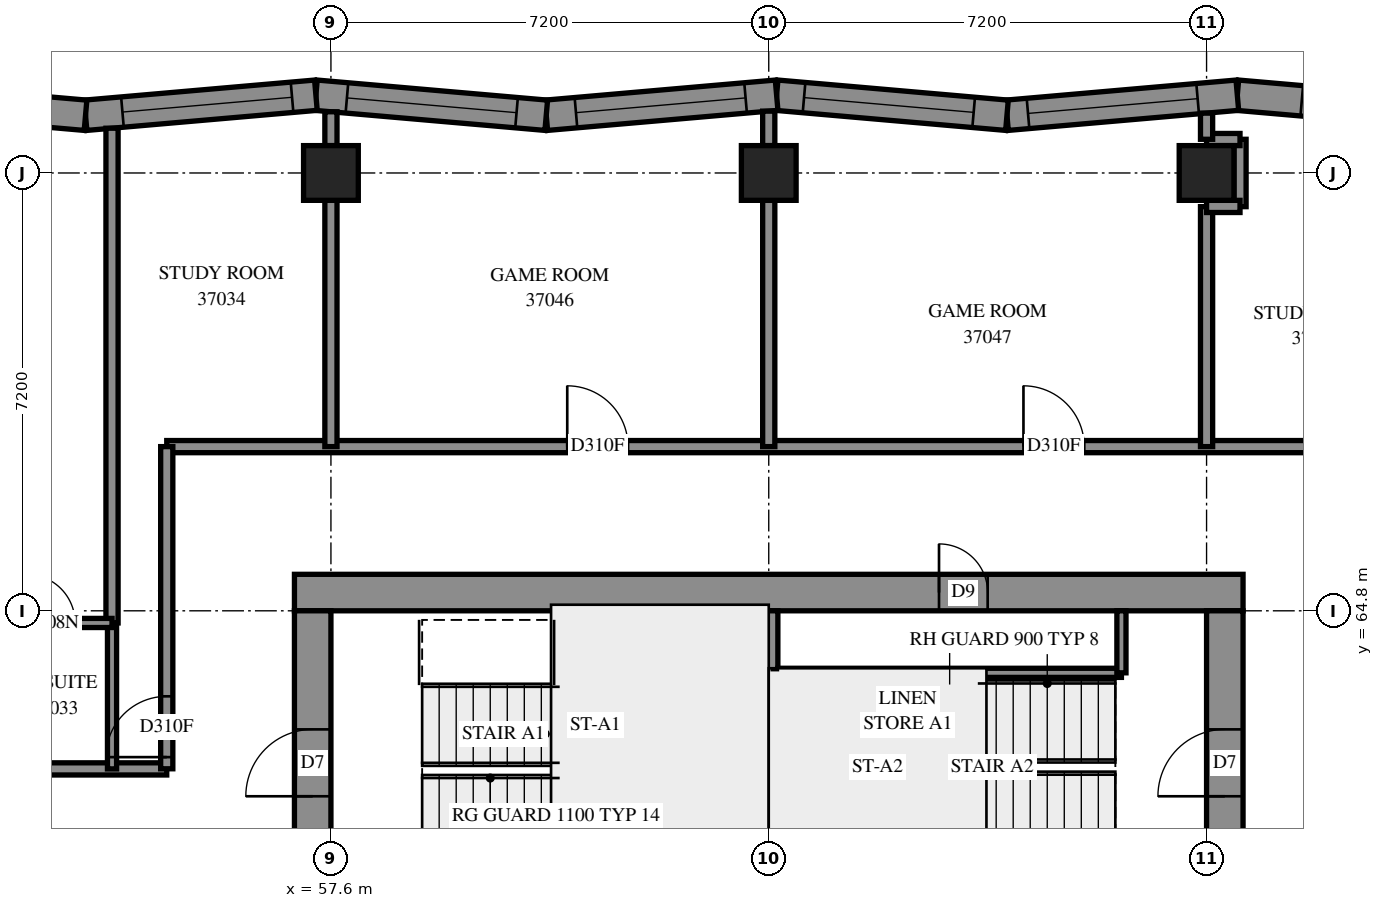
"""IFC4 building model, lengths in metres.
Left out: names, types, materials, properties, quantities, classifications, styles, units other than length and angle.
Written with IfcOpenShell. Run it as: python <this file> out.ifc"""

import sys

from ifc_helpers import new_model, si_unit, direction, frame, frame_2d, origin, origin_2d, place, context, subcontext, project, spatial, polyline, rectangle, outline, extrude, element, fill, save


model = new_model("IFC4")
c1 = context("Model", 3, precision=1e-05, world=origin(), true_north=direction((0.0, 1.0)))
c2 = subcontext(c1, "Body", "Model", "MODEL_VIEW")
j1 = project(units=[si_unit("LENGTHUNIT", "METRE"), si_unit("PLANEANGLEUNIT", "RADIAN")], contexts=[c1])
p1 = place(None, origin())
s1 = spatial("IfcSite", under=j1, at=p1, CompositionType="ELEMENT")
p2 = place(p1, origin())
s2 = spatial("IfcBuilding", under=s1, at=p2, CompositionType="ELEMENT")
p3 = place(p2, frame((0.0, 0.0, 138.8)))
s3 = spatial("IfcBuildingStorey", under=s2, at=p3, CompositionType="ELEMENT", Elevation=138.8)
for number, where, z_axis, x_axis in (
    (1, (57.6, 72.0, 0.0), (0.0, 0.0, 1.0), (1.0, 0.0, 0.0)),
    (2, (64.8, 72.0, 0.0), (0.0, 0.0, 1.0), (1.0, 0.0, 0.0)),
    (3, (72.0, 72.0, 0.0), (0.0, 0.0, 1.0), (1.0, 0.0, 0.0)),
):
    element("IfcColumn", number, at=place(p3, frame(where, z_axis=z_axis, x_axis=x_axis)), inside=s3, PredefinedType="COLUMN", context=c2, shape_type="SweptSolid", body=[
        extrude(rectangle(XDim=0.9, YDim=0.9, at=origin_2d()), origin(), (0.0, 0.0, 1.0), 3.1),
    ])
p4 = place(p3, frame((57.0, 65.1, -0.3), z_axis=(0.0, 0.0, 1.0), x_axis=(1.0, 0.0, 0.0)))
e4 = element("IfcWall", 4, at=p4, inside=s3, PredefinedType="SHEAR", context=c2, shape_type="SweptSolid", body=[
    extrude(rectangle(XDim=15.6, YDim=0.6, at=frame_2d((7.8, 0.0))), origin(), (0.0, 0.0, 1.0), 2.7),
])
p5 = place(p4, frame((10.6, 0.0, 0.3)))
e5 = element("IfcOpeningElement", 5, at=p5, cuts=e4, PredefinedType="OPENING", context=c2, shape_type="SweptSolid", body=[
    extrude(rectangle(XDim=0.8, YDim=2.1, at=frame_2d((0.4, 1.05))), frame((0.0, 0.31, 0.0), z_axis=(0.0, -1.0, 0.0), x_axis=(1.0, 0.0, 0.0)), (0.0, 0.0, 1.0), 0.62),
])
p6 = place(p3, frame((57.3, 50.4, -0.3), z_axis=(0.0, 0.0, 1.0), x_axis=(0.0, 1.0, 0.0)))
e6 = element("IfcWall", 6, at=p6, inside=s3, PredefinedType="SHEAR", context=c2, shape_type="SweptSolid", body=[
    extrude(rectangle(XDim=14.4, YDim=0.6, at=frame_2d((7.2, 0.0))), origin(), (0.0, 0.0, 1.0), 2.7),
])
p7 = place(p6, frame((4.55, 0.0, 0.3)))
e7 = element("IfcOpeningElement", 7, at=p7, cuts=e6, PredefinedType="OPENING", context=c2, shape_type="SweptSolid", body=[
    extrude(rectangle(XDim=1.1, YDim=2.1, at=frame_2d((0.55, 1.05))), frame((0.0, 0.31, 0.0), z_axis=(0.0, -1.0, 0.0), x_axis=(1.0, 0.0, 0.0)), (0.0, 0.0, 1.0), 0.62),
])
p8 = place(p6, frame((11.35, 0.0, 0.3)))
e8 = element("IfcOpeningElement", 8, at=p8, cuts=e6, PredefinedType="OPENING", context=c2, shape_type="SweptSolid", body=[
    extrude(rectangle(XDim=1.1, YDim=2.1, at=frame_2d((0.55, 1.05))), frame((0.0, 0.31, 0.0), z_axis=(0.0, -1.0, 0.0), x_axis=(1.0, 0.0, 0.0)), (0.0, 0.0, 1.0), 0.62),
])
p9 = place(p3, frame((72.3, 50.4, -0.3), z_axis=(0.0, 0.0, 1.0), x_axis=(0.0, 1.0, 0.0)))
e9 = element("IfcWall", 9, at=p9, inside=s3, PredefinedType="SHEAR", context=c2, shape_type="SweptSolid", body=[
    extrude(rectangle(XDim=14.4, YDim=0.6, at=frame_2d((7.2, 0.0))), origin(), (0.0, 0.0, 1.0), 2.7),
])
p10 = place(p9, frame((4.55, 0.0, 0.3)))
e10 = element("IfcOpeningElement", 10, at=p10, cuts=e9, PredefinedType="OPENING", context=c2, shape_type="SweptSolid", body=[
    extrude(rectangle(XDim=1.1, YDim=2.1, at=frame_2d((0.55, 1.05))), frame((0.0, 0.31, 0.0), z_axis=(0.0, -1.0, 0.0), x_axis=(1.0, 0.0, 0.0)), (0.0, 0.0, 1.0), 0.62),
])
p11 = place(p9, frame((11.35, 0.0, 0.3)))
e11 = element("IfcOpeningElement", 11, at=p11, cuts=e9, PredefinedType="OPENING", context=c2, shape_type="SweptSolid", body=[
    extrude(rectangle(XDim=1.1, YDim=2.1, at=frame_2d((0.55, 1.05))), frame((0.0, 0.31, 0.0), z_axis=(0.0, -1.0, 0.0), x_axis=(1.0, 0.0, 0.0)), (0.0, 0.0, 1.0), 0.62),
])
p12 = place(p3, frame((64.8, 60.6, 0.0), z_axis=(0.0, 0.0, 1.0), x_axis=(0.0, 1.0, 0.0)))
e12 = element("IfcWall", 12, at=p12, inside=s3, PredefinedType="SOLIDWALL", context=c2, shape_type="SweptSolid", body=[
    extrude(rectangle(XDim=4.2, YDim=0.3, at=frame_2d((2.1, 0.0))), origin(), (0.0, 0.0, 1.0), 3.1),
])
p13 = place(p3, frame((76.314, 72.947, 0.0), z_axis=(0.0, 0.0, 1.0), x_axis=(-0.9962271263, 0.0867842891, 0.0)))
e13 = element("IfcWall", 13, at=p13, inside=s3, PredefinedType="SOLIDWALL", context=c2, shape_type="SweptSolid", body=[
    extrude(outline(polyline([(0.041, -0.25), (3.844, -0.25), (3.8, 0.25), (-0.041, 0.25), (0.041, -0.25)])), origin(), (0.0, 0.0, 1.0), 3.1),
])
p14 = place(p13, frame((1.558, 0.0, 0.45)))
e14 = element("IfcOpeningElement", 14, at=p14, cuts=e13, PredefinedType="OPENING", context=c2, shape_type="SweptSolid", body=[
    extrude(rectangle(XDim=1.2, YDim=2.5, at=frame_2d((0.6, 1.25))), frame((0.0, 0.26, 0.0), z_axis=(0.0, -1.0, 0.0), x_axis=(1.0, 0.0, 0.0)), (0.0, 0.0, 1.0), 0.52),
])
p15 = place(p3, frame((72.506, 73.279, 0.0), z_axis=(0.0, 0.0, 1.0), x_axis=(-0.9962273538, -0.0867816769, 0.0)))
e15 = element("IfcWall", 15, at=p15, inside=s3, PredefinedType="SOLIDWALL", context=c2, shape_type="SweptSolid", body=[
    extrude(outline(polyline([(-0.022, -0.25), (3.781, -0.25), (3.824, 0.25), (0.022, 0.25), (-0.022, -0.25)])), origin(), (0.0, 0.0, 1.0), 3.1),
])
p16 = place(p15, frame((0.655, 0.0, 0.45)))
e16 = element("IfcOpeningElement", 16, at=p16, cuts=e15, PredefinedType="OPENING", context=c2, shape_type="SweptSolid", body=[
    extrude(rectangle(XDim=2.8, YDim=2.5, at=frame_2d((1.4, 1.25))), frame((0.0, 0.26, 0.0), z_axis=(0.0, -1.0, 0.0), x_axis=(1.0, 0.0, 0.0)), (0.0, 0.0, 1.0), 0.52),
])
p17 = place(p3, frame((68.718, 72.949, 0.0), z_axis=(0.0, 0.0, 1.0), x_axis=(-0.9962273538, 0.0867816769, 0.0)))
e17 = element("IfcWall", 17, at=p17, inside=s3, PredefinedType="SOLIDWALL", context=c2, shape_type="SweptSolid", body=[
    extrude(outline(polyline([(0.022, -0.25), (3.824, -0.25), (3.781, 0.25), (-0.022, 0.25), (0.022, -0.25)])), origin(), (0.0, 0.0, 1.0), 3.1),
])
p18 = place(p17, frame((0.55, 0.0, 0.45)))
e18 = element("IfcOpeningElement", 18, at=p18, cuts=e17, PredefinedType="OPENING", context=c2, shape_type="SweptSolid", body=[
    extrude(rectangle(XDim=2.8, YDim=2.5, at=frame_2d((1.4, 1.25))), frame((0.0, 0.26, 0.0), z_axis=(0.0, -1.0, 0.0), x_axis=(1.0, 0.0, 0.0)), (0.0, 0.0, 1.0), 0.52),
])
p19 = place(p3, frame((64.929, 73.279, 0.0), z_axis=(0.0, 0.0, 1.0), x_axis=(-0.9962271558, -0.0867839505, 0.0)))
e19 = element("IfcWall", 19, at=p19, inside=s3, PredefinedType="SOLIDWALL", context=c2, shape_type="SweptSolid", body=[
    extrude(outline(polyline([(-0.022, -0.25), (3.781, -0.25), (3.824, 0.25), (0.022, 0.25), (-0.022, -0.25)])), origin(), (0.0, 0.0, 1.0), 3.1),
])
p20 = place(p19, frame((0.512, 0.0, 0.45)))
e20 = element("IfcOpeningElement", 20, at=p20, cuts=e19, PredefinedType="OPENING", context=c2, shape_type="SweptSolid", body=[
    extrude(rectangle(XDim=2.8, YDim=2.5, at=frame_2d((1.4, 1.25))), frame((0.0, 0.26, 0.0), z_axis=(0.0, -1.0, 0.0), x_axis=(1.0, 0.0, 0.0)), (0.0, 0.0, 1.0), 0.52),
])
p21 = place(p3, frame((61.141, 72.949, 0.0), z_axis=(0.0, 0.0, 1.0), x_axis=(-0.9962273538, 0.0867816769, 0.0)))
e21 = element("IfcWall", 21, at=p21, inside=s3, PredefinedType="SOLIDWALL", context=c2, shape_type="SweptSolid", body=[
    extrude(outline(polyline([(0.022, -0.25), (3.824, -0.25), (3.781, 0.25), (-0.022, 0.25), (0.022, -0.25)])), origin(), (0.0, 0.0, 1.0), 3.1),
])
p22 = place(p21, frame((0.49, 0.0, 0.45)))
e22 = element("IfcOpeningElement", 22, at=p22, cuts=e21, PredefinedType="OPENING", context=c2, shape_type="SweptSolid", body=[
    extrude(rectangle(XDim=2.8, YDim=2.5, at=frame_2d((1.4, 1.25))), frame((0.0, 0.26, 0.0), z_axis=(0.0, -1.0, 0.0), x_axis=(1.0, 0.0, 0.0)), (0.0, 0.0, 1.0), 0.52),
])
p23 = place(p3, frame((57.353, 73.279, 0.0), z_axis=(0.0, 0.0, 1.0), x_axis=(-0.9962273538, -0.0867816769, 0.0)))
e23 = element("IfcWall", 23, at=p23, inside=s3, PredefinedType="SOLIDWALL", context=c2, shape_type="SweptSolid", body=[
    extrude(outline(polyline([(-0.022, -0.25), (3.781, -0.25), (3.824, 0.25), (0.022, 0.25), (-0.022, -0.25)])), origin(), (0.0, 0.0, 1.0), 3.1),
])
p24 = place(p23, frame((0.394, 0.0, 0.45)))
e24 = element("IfcOpeningElement", 24, at=p24, cuts=e23, PredefinedType="OPENING", context=c2, shape_type="SweptSolid", body=[
    extrude(rectangle(XDim=2.8, YDim=2.5, at=frame_2d((1.4, 1.25))), frame((0.0, 0.26, 0.0), z_axis=(0.0, -1.0, 0.0), x_axis=(1.0, 0.0, 0.0)), (0.0, 0.0, 1.0), 0.52),
])
p25 = place(p3, frame((53.564, 72.949, 0.0), z_axis=(0.0, 0.0, 1.0), x_axis=(-0.9962271558, 0.0867839505, 0.0)))
e25 = element("IfcWall", 25, at=p25, inside=s3, PredefinedType="SOLIDWALL", context=c2, shape_type="SweptSolid", body=[
    extrude(outline(polyline([(0.022, -0.25), (3.824, -0.25), (3.781, 0.25), (-0.022, 0.25), (0.022, -0.25)])), origin(), (0.0, 0.0, 1.0), 3.1),
])
p26 = place(p25, frame((1.088, 0.0, 0.45)))
e26 = element("IfcOpeningElement", 26, at=p26, cuts=e25, PredefinedType="OPENING", context=c2, shape_type="SweptSolid", body=[
    extrude(rectangle(XDim=1.2, YDim=2.5, at=frame_2d((0.6, 1.25))), frame((0.0, 0.26, 0.0), z_axis=(0.0, -1.0, 0.0), x_axis=(1.0, 0.0, 0.0)), (0.0, 0.0, 1.0), 0.52),
])
p27 = place(p3, frame((64.95, 63.78, 0.0), z_axis=(0.0, 0.0, 1.0), x_axis=(1.0, 0.0, 0.0)))
e27 = element("IfcWall", 27, at=p27, inside=s3, PredefinedType="PARTITIONING", context=c2, shape_type="SweptSolid", body=[
    extrude(rectangle(XDim=5.65, YDim=0.15, at=frame_2d((2.825, 0.0))), origin(), (0.0, 0.0, 1.0), 3.1),
])
p28 = place(p3, frame((70.6, 63.78, 0.0), z_axis=(0.0, 0.0, 1.0), x_axis=(0.0, 1.0, 0.0)))
e28 = element("IfcWall", 28, at=p28, inside=s3, PredefinedType="PARTITIONING", context=c2, shape_type="SweptSolid", body=[
    extrude(rectangle(XDim=1.02, YDim=0.15, at=frame_2d((0.51, 0.0))), origin(), (0.0, 0.0, 1.0), 3.1),
])
p29 = place(p3, frame((54.9, 67.5, 0.0), z_axis=(0.0, 0.0, 1.0), x_axis=(1.0, 0.0, 0.0)))
e29 = element("IfcWall", 29, at=p29, inside=s3, PredefinedType="PARTITIONING", context=c2, shape_type="SweptSolid", body=[
    extrude(rectangle(XDim=19.8, YDim=0.2, at=frame_2d((9.9, 0.0))), origin(), (0.0, 0.0, 1.0), 3.1),
])
p30 = place(p29, frame((6.586, 0.0, 0.0)))
e30 = element("IfcOpeningElement", 30, at=p30, cuts=e29, PredefinedType="OPENING", context=c2, shape_type="SweptSolid", body=[
    extrude(rectangle(XDim=1.0, YDim=2.1, at=frame_2d((0.5, 1.05))), frame((0.0, 0.11, 0.0), z_axis=(0.0, -1.0, 0.0), x_axis=(1.0, 0.0, 0.0)), (0.0, 0.0, 1.0), 0.22),
])
p31 = place(p29, frame((14.089, 0.0, 0.0)))
e31 = element("IfcOpeningElement", 31, at=p31, cuts=e29, PredefinedType="OPENING", context=c2, shape_type="SweptSolid", body=[
    extrude(rectangle(XDim=1.0, YDim=2.1, at=frame_2d((0.5, 1.05))), frame((0.0, 0.11, 0.0), z_axis=(0.0, -1.0, 0.0), x_axis=(1.0, 0.0, 0.0)), (0.0, 0.0, 1.0), 0.22),
])
p32 = place(p3, frame((40.602, 62.2, 0.0), z_axis=(0.0, 0.0, 1.0), x_axis=(1.0, 0.0, 0.0)))
e32 = element("IfcWall", 32, at=p32, inside=s3, PredefinedType="PARTITIONING", context=c2, shape_type="SweptSolid", body=[
    extrude(rectangle(XDim=14.298, YDim=0.2, at=frame_2d((7.149, 0.0))), origin(), (0.0, 0.0, 1.0), 3.1),
])
p33 = place(p32, frame((1.306, 0.0, 0.0)))
e33 = element("IfcOpeningElement", 33, at=p33, cuts=e32, PredefinedType="OPENING", context=c2, shape_type="SweptSolid", body=[
    extrude(rectangle(XDim=0.9, YDim=2.1, at=frame_2d((0.45, 1.05))), frame((0.0, 0.11, 0.0), z_axis=(0.0, -1.0, 0.0), x_axis=(1.0, 0.0, 0.0)), (0.0, 0.0, 1.0), 0.22),
])
p34 = place(p32, frame((8.455, 0.0, 0.0)))
e34 = element("IfcOpeningElement", 34, at=p34, cuts=e32, PredefinedType="OPENING", context=c2, shape_type="SweptSolid", body=[
    extrude(rectangle(XDim=0.9, YDim=2.1, at=frame_2d((0.45, 1.05))), frame((0.0, 0.11, 0.0), z_axis=(0.0, -1.0, 0.0), x_axis=(1.0, 0.0, 0.0)), (0.0, 0.0, 1.0), 0.22),
])
p35 = place(p3, frame((54.0, 64.6, 0.0), z_axis=(0.0, 0.0, 1.0), x_axis=(0.0, 1.0, 0.0)))
e35 = element("IfcWall", 35, at=p35, inside=s3, PredefinedType="PARTITIONING", context=c2, shape_type="SweptSolid", body=[
    extrude(rectangle(XDim=8.136, YDim=0.2, at=frame_2d((4.068, 0.0))), origin(), (0.0, 0.0, 1.0), 3.1),
])
p36 = place(p3, frame((54.9, 62.202, 0.0), z_axis=(0.0, 0.0, 1.0), x_axis=(0.0, 1.0, 0.0)))
e36 = element("IfcWall", 36, at=p36, inside=s3, PredefinedType="PARTITIONING", context=c2, shape_type="SweptSolid", body=[
    extrude(rectangle(XDim=5.298, YDim=0.2, at=frame_2d((2.649, 0.0))), origin(), (0.0, 0.0, 1.0), 3.1),
])
p37 = place(p36, frame((0.192, 0.0, 0.0)))
e37 = element("IfcOpeningElement", 37, at=p37, cuts=e36, PredefinedType="OPENING", context=c2, shape_type="SweptSolid", body=[
    extrude(rectangle(XDim=1.0, YDim=2.1, at=frame_2d((0.5, 1.05))), frame((0.0, 0.11, 0.0), z_axis=(0.0, -1.0, 0.0), x_axis=(1.0, 0.0, 0.0)), (0.0, 0.0, 1.0), 0.22),
])
for number, where, z_axis, x_axis in (
    (38, (57.6, 67.5, 0.0), (0.0, 0.0, 1.0), (0.0, 1.0, 0.0)),
    (39, (64.8, 67.5, 0.0), (0.0, 0.0, 1.0), (0.0, 1.0, 0.0)),
):
    element("IfcWall", number, at=place(p3, frame(where, z_axis=z_axis, x_axis=x_axis)), inside=s3, PredefinedType="PARTITIONING", context=c2, shape_type="SweptSolid", body=[
        extrude(rectangle(XDim=4.05, YDim=0.2, at=frame_2d((2.025, 0.0))), origin(), (0.0, 0.0, 1.0), 3.1),
    ])
p38 = place(p3, frame((72.0, 67.5, 0.0), z_axis=(0.0, 0.0, 1.0), x_axis=(0.0, 1.0, 0.0)))
e40 = element("IfcWall", 40, at=p38, inside=s3, PredefinedType="PARTITIONING", context=c2, shape_type="SweptSolid", body=[
    extrude(rectangle(XDim=3.946, YDim=0.2, at=frame_2d((1.973, 0.0))), origin(), (0.0, 0.0, 1.0), 3.1),
])
p39 = place(p3, frame((54.0, 62.2, 0.0), z_axis=(0.0, 0.0, 1.0), x_axis=(0.0, 1.0, 0.0)))
e41 = element("IfcWall", 41, at=p39, inside=s3, PredefinedType="PARTITIONING", context=c2, shape_type="SweptSolid", body=[
    extrude(rectangle(XDim=2.4, YDim=0.15, at=frame_2d((1.2, 0.0))), origin(), (0.0, 0.0, 1.0), 3.1),
])
p40 = place(p3, frame((52.1, 64.6, 0.0), z_axis=(0.0, 0.0, 1.0), x_axis=(1.0, 0.0, 0.0)))
e42 = element("IfcWall", 42, at=p40, inside=s3, PredefinedType="PARTITIONING", context=c2, shape_type="SweptSolid", body=[
    extrude(rectangle(XDim=1.9, YDim=0.15, at=frame_2d((0.95, 0.0))), origin(), (0.0, 0.0, 1.0), 3.1),
])
p41 = place(p40, frame((0.493, 0.0, 0.0)))
e43 = element("IfcOpeningElement", 43, at=p41, cuts=e42, PredefinedType="OPENING", context=c2, shape_type="SweptSolid", body=[
    extrude(rectangle(XDim=0.8, YDim=2.1, at=frame_2d((0.4, 1.05))), frame((0.0, 0.085, 0.0), z_axis=(0.0, -1.0, 0.0), x_axis=(1.0, 0.0, 0.0)), (0.0, 0.0, 1.0), 0.17),
])
p42 = place(p3, frame((72.55, 71.446, 0.0), z_axis=(0.0, 0.0, 1.0), x_axis=(0.0, 1.0, 0.0)))
e44 = element("IfcWall", 44, at=p42, inside=s3, PredefinedType="PARTITIONING", context=c2, shape_type="SweptSolid", body=[
    extrude(rectangle(XDim=1.108, YDim=0.2, at=frame_2d((0.554, 0.0))), origin(), (0.0, 0.0, 1.0), 3.1),
])
for number, where, z_axis, x_axis in (
    (45, (72.0, 71.45, 0.0), (0.0, 0.0, 1.0), (1.0, 0.0, 0.0)),
    (46, (72.0, 72.55, 0.0), (0.0, 0.0, 1.0), (1.0, 0.0, 0.0)),
):
    element("IfcWall", number, at=place(p3, frame(where, z_axis=z_axis, x_axis=x_axis)), inside=s3, PredefinedType="PARTITIONING", context=c2, shape_type="SweptSolid", body=[
        extrude(rectangle(XDim=0.55, YDim=0.2, at=frame_2d((0.275, 0.0))), origin(), (0.0, 0.0, 1.0), 3.1),
    ])
p43 = place(p3, frame((64.8, 72.45, 0.0), z_axis=(0.0, 0.0, 1.0), x_axis=(0.0, 1.0, 0.0)))
e47 = element("IfcWall", 47, at=p43, inside=s3, PredefinedType="PARTITIONING", context=c2, shape_type="SweptSolid", body=[
    extrude(rectangle(XDim=0.567, YDim=0.2, at=frame_2d((0.283, 0.0))), origin(), (0.0, 0.0, 1.0), 3.1),
])
p44 = place(p3, frame((57.6, 72.45, 0.0), z_axis=(0.0, 0.0, 1.0), x_axis=(0.0, 1.0, 0.0)))
e48 = element("IfcWall", 48, at=p44, inside=s3, PredefinedType="PARTITIONING", context=c2, shape_type="SweptSolid", body=[
    extrude(rectangle(XDim=0.557, YDim=0.2, at=frame_2d((0.278, 0.0))), origin(), (0.0, 0.0, 1.0), 3.1),
])
p45 = place(p3, frame((72.0, 72.554, 0.0), z_axis=(0.0, 0.0, 1.0), x_axis=(0.0, 1.0, 0.0)))
e49 = element("IfcWall", 49, at=p45, inside=s3, PredefinedType="PARTITIONING", context=c2, shape_type="SweptSolid", body=[
    extrude(rectangle(XDim=0.43, YDim=0.2, at=frame_2d((0.215, 0.0))), origin(), (0.0, 0.0, 1.0), 3.1),
])
p46 = place(p14, origin())
e50 = element("IfcWindow", 50, at=p46, inside=s3, PartitioningType="SINGLE_PANEL", PredefinedType="WINDOW", context=c2, shape_type="SweptSolid", body=[
    extrude(rectangle(XDim=1.2, YDim=2.5, at=frame_2d((0.6, 1.25))), frame((0.0, 0.18, 0.0), z_axis=(0.0, -1.0, 0.0), x_axis=(1.0, 0.0, 0.0)), (0.0, 0.0, 1.0), 0.06),
])
fill(e14, e50)
p47 = place(p16, origin())
e51 = element("IfcWindow", 51, at=p47, inside=s3, PartitioningType="SINGLE_PANEL", PredefinedType="WINDOW", context=c2, shape_type="SweptSolid", body=[
    extrude(rectangle(XDim=2.8, YDim=2.5, at=frame_2d((1.4, 1.25))), frame((0.0, 0.18, 0.0), z_axis=(0.0, -1.0, 0.0), x_axis=(1.0, 0.0, 0.0)), (0.0, 0.0, 1.0), 0.06),
])
fill(e16, e51)
p48 = place(p18, origin())
e52 = element("IfcWindow", 52, at=p48, inside=s3, PartitioningType="SINGLE_PANEL", PredefinedType="WINDOW", context=c2, shape_type="SweptSolid", body=[
    extrude(rectangle(XDim=2.8, YDim=2.5, at=frame_2d((1.4, 1.25))), frame((0.0, 0.18, 0.0), z_axis=(0.0, -1.0, 0.0), x_axis=(1.0, 0.0, 0.0)), (0.0, 0.0, 1.0), 0.06),
])
fill(e18, e52)
p49 = place(p20, origin())
e53 = element("IfcWindow", 53, at=p49, inside=s3, PartitioningType="SINGLE_PANEL", PredefinedType="WINDOW", context=c2, shape_type="SweptSolid", body=[
    extrude(rectangle(XDim=2.8, YDim=2.5, at=frame_2d((1.4, 1.25))), frame((0.0, 0.18, 0.0), z_axis=(0.0, -1.0, 0.0), x_axis=(1.0, 0.0, 0.0)), (0.0, 0.0, 1.0), 0.06),
])
fill(e20, e53)
p50 = place(p22, origin())
e54 = element("IfcWindow", 54, at=p50, inside=s3, PartitioningType="SINGLE_PANEL", PredefinedType="WINDOW", context=c2, shape_type="SweptSolid", body=[
    extrude(rectangle(XDim=2.8, YDim=2.5, at=frame_2d((1.4, 1.25))), frame((0.0, 0.18, 0.0), z_axis=(0.0, -1.0, 0.0), x_axis=(1.0, 0.0, 0.0)), (0.0, 0.0, 1.0), 0.06),
])
fill(e22, e54)
p51 = place(p24, origin())
e55 = element("IfcWindow", 55, at=p51, inside=s3, PartitioningType="SINGLE_PANEL", PredefinedType="WINDOW", context=c2, shape_type="SweptSolid", body=[
    extrude(rectangle(XDim=2.8, YDim=2.5, at=frame_2d((1.4, 1.25))), frame((0.0, 0.18, 0.0), z_axis=(0.0, -1.0, 0.0), x_axis=(1.0, 0.0, 0.0)), (0.0, 0.0, 1.0), 0.06),
])
fill(e24, e55)
p52 = place(p5, origin())
e56 = element("IfcDoor", 56, at=p52, inside=s3, OperationType="SINGLE_SWING_RIGHT", PredefinedType="DOOR", context=c2, shape_type="SweptSolid", body=[
    extrude(rectangle(XDim=0.8, YDim=2.1, at=frame_2d((0.4, 1.05))), frame((0.0, 0.025, 0.0), z_axis=(0.0, -1.0, 0.0), x_axis=(1.0, 0.0, 0.0)), (0.0, 0.0, 1.0), 0.05),
])
fill(e5, e56)
p53 = place(p8, origin())
e57 = element("IfcDoor", 57, at=p53, inside=s3, OperationType="SINGLE_SWING_LEFT", PredefinedType="DOOR", context=c2, shape_type="SweptSolid", body=[
    extrude(rectangle(XDim=1.1, YDim=2.1, at=frame_2d((0.55, 1.05))), frame((0.0, 0.025, 0.0), z_axis=(0.0, -1.0, 0.0), x_axis=(1.0, 0.0, 0.0)), (0.0, 0.0, 1.0), 0.05),
])
fill(e8, e57)
p54 = place(p11, origin())
e58 = element("IfcDoor", 58, at=p54, inside=s3, OperationType="SINGLE_SWING_RIGHT", PredefinedType="DOOR", context=c2, shape_type="SweptSolid", body=[
    extrude(rectangle(XDim=1.1, YDim=2.1, at=frame_2d((0.55, 1.05))), frame((0.0, 0.025, 0.0), z_axis=(0.0, -1.0, 0.0), x_axis=(1.0, 0.0, 0.0)), (0.0, 0.0, 1.0), 0.05),
])
fill(e11, e58)
p55 = place(p41, origin())
e59 = element("IfcDoor", 59, at=p55, inside=s3, OperationType="SINGLE_SWING_RIGHT", PredefinedType="DOOR", context=c2, shape_type="SweptSolid", body=[
    extrude(rectangle(XDim=0.8, YDim=2.1, at=frame_2d((0.4, 1.05))), frame((0.0, 0.025, 0.0), z_axis=(0.0, -1.0, 0.0), x_axis=(1.0, 0.0, 0.0)), (0.0, 0.0, 1.0), 0.05),
])
fill(e43, e59)
p56 = place(p37, origin())
e60 = element("IfcDoor", 60, at=p56, inside=s3, OperationType="SINGLE_SWING_LEFT", PredefinedType="DOOR", context=c2, shape_type="SweptSolid", body=[
    extrude(rectangle(XDim=1.0, YDim=2.1, at=frame_2d((0.5, 1.05))), frame((0.0, 0.025, 0.0), z_axis=(0.0, -1.0, 0.0), x_axis=(1.0, 0.0, 0.0)), (0.0, 0.0, 1.0), 0.05),
])
fill(e37, e60)
p57 = place(p30, origin())
e61 = element("IfcDoor", 61, at=p57, inside=s3, OperationType="SINGLE_SWING_RIGHT", PredefinedType="DOOR", context=c2, shape_type="SweptSolid", body=[
    extrude(rectangle(XDim=1.0, YDim=2.1, at=frame_2d((0.5, 1.05))), frame((0.0, 0.025, 0.0), z_axis=(0.0, -1.0, 0.0), x_axis=(1.0, 0.0, 0.0)), (0.0, 0.0, 1.0), 0.05),
])
fill(e30, e61)
p58 = place(p31, origin())
e62 = element("IfcDoor", 62, at=p58, inside=s3, OperationType="SINGLE_SWING_RIGHT", PredefinedType="DOOR", context=c2, shape_type="SweptSolid", body=[
    extrude(rectangle(XDim=1.0, YDim=2.1, at=frame_2d((0.5, 1.05))), frame((0.0, 0.025, 0.0), z_axis=(0.0, -1.0, 0.0), x_axis=(1.0, 0.0, 0.0)), (0.0, 0.0, 1.0), 0.05),
])
fill(e31, e62)
save(model, sys.argv[1])
